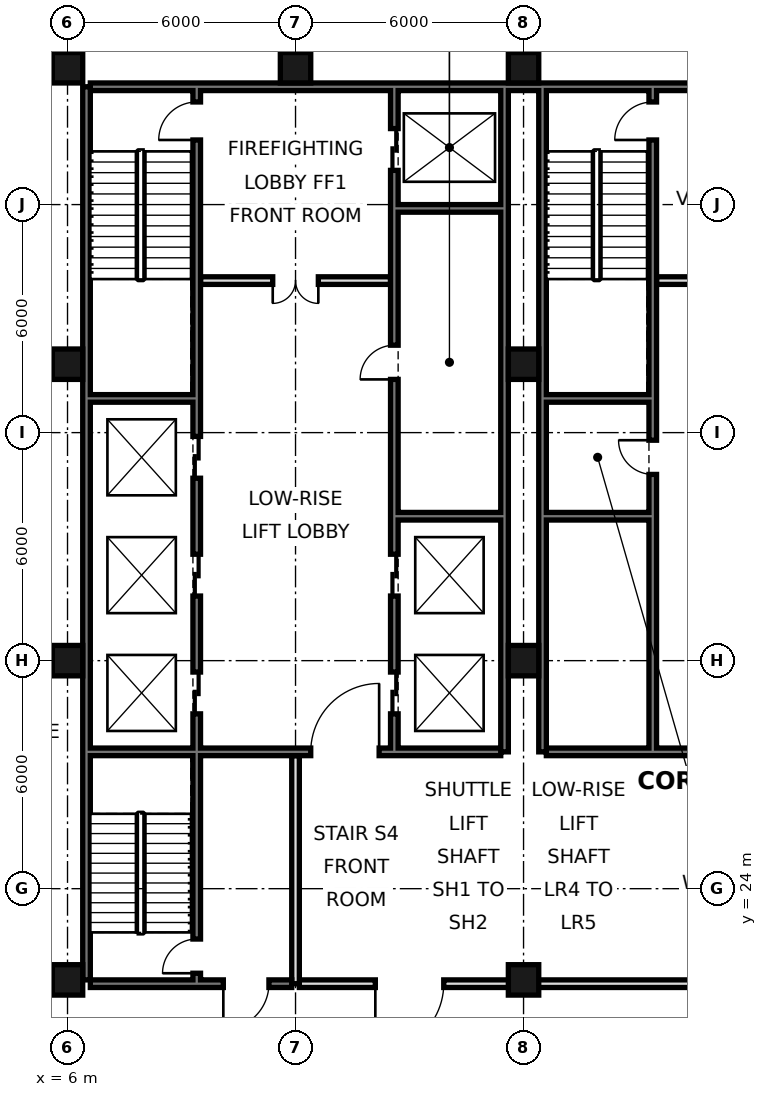
"""IFC4 building model, lengths in metres.
Left out: names, types, materials, properties, quantities, classifications, styles, units other than length and angle.
Written with IfcOpenShell. Run it as: python <this file> out.ifc"""

import sys

from ifc_helpers import new_model, si_unit, direction, frame, frame_2d, origin, origin_2d, place, context, subcontext, project, spatial, rectangle, hollow_rectangle, extrude, element, fill, save


model = new_model("IFC4")
c1 = context("Model", 3, precision=1e-05, world=origin(), true_north=direction((0.0, 1.0)))
c2 = subcontext(c1, "Body", "Model", "MODEL_VIEW")
j1 = project(units=[si_unit("LENGTHUNIT", "METRE"), si_unit("PLANEANGLEUNIT", "RADIAN")], contexts=[c1])
p1 = place(None, origin())
s1 = spatial("IfcSite", under=j1, at=p1, CompositionType="ELEMENT")
p2 = place(p1, origin())
s2 = spatial("IfcBuilding", under=s1, at=p2, CompositionType="ELEMENT")
p3 = place(p2, frame((0.0, 0.0, -4.5)))
s3 = spatial("IfcBuildingStorey", under=s2, at=p3, CompositionType="ELEMENT", Elevation=-4.5)
for number, where, z_axis, x_axis in (
    (1, (6.0, 21.6, 0.0), (0.0, 0.0, 1.0), (1.0, 0.0, 0.0)),
    (2, (6.0, 30.0, 0.0), (0.0, 0.0, 1.0), (1.0, 0.0, 0.0)),
    (3, (6.0, 37.8, 0.0), (0.0, 0.0, 1.0), (1.0, 0.0, 0.0)),
    (4, (6.0, 45.6, 0.0), (0.0, 0.0, 1.0), (1.0, 0.0, 0.0)),
    (5, (12.0, 45.6, 0.0), (0.0, 0.0, 1.0), (1.0, 0.0, 0.0)),
    (6, (18.0, 21.6, 0.0), (0.0, 0.0, 1.0), (1.0, 0.0, 0.0)),
    (7, (18.0, 30.0, 0.0), (0.0, 0.0, 1.0), (1.0, 0.0, 0.0)),
    (8, (18.0, 37.8, 0.0), (0.0, 0.0, 1.0), (1.0, 0.0, 0.0)),
    (9, (18.0, 45.6, 0.0), (0.0, 0.0, 1.0), (1.0, 0.0, 0.0)),
):
    element("IfcColumn", number, at=place(p3, frame(where, z_axis=z_axis, x_axis=x_axis)), inside=s3, PredefinedType="COLUMN", context=c2, shape_type="SweptSolid", body=[
        extrude(hollow_rectangle(XDim=0.8, YDim=0.8, WallThickness=0.07, at=origin_2d()), origin(), (0.0, 0.0, 1.0), 4.5),
    ])
p4 = place(p3, frame((6.5, 21.6, 0.0), z_axis=(0.0, 0.0, 1.0), x_axis=(0.0, 1.0, 0.0)))
e10 = element("IfcWall", 10, at=p4, inside=s3, PredefinedType="SOLIDWALL", context=c2, shape_type="SweptSolid", body=[
    extrude(rectangle(XDim=23.5, YDim=0.2, at=frame_2d((11.75, 0.0))), origin(), (0.0, 0.0, 1.0), 4.14),
])
p5 = place(p3, frame((6.6, 45.1, 0.0), z_axis=(0.0, 0.0, 1.0), x_axis=(1.0, 0.0, 0.0)))
e11 = element("IfcWall", 11, at=p5, inside=s3, PredefinedType="SOLIDWALL", context=c2, shape_type="SweptSolid", body=[
    extrude(rectangle(XDim=34.8, YDim=0.2, at=frame_2d((17.4, 0.0))), origin(), (0.0, 0.0, 1.0), 4.14),
])
for number, where, z_axis, x_axis in (
    (12, (17.5, 27.6, 0.0), (0.0, 0.0, 1.0), (0.0, 1.0, 0.0)),
    (13, (18.5, 27.6, 0.0), (0.0, 0.0, 1.0), (0.0, 1.0, 0.0)),
):
    element("IfcWall", number, at=place(p3, frame(where, z_axis=z_axis, x_axis=x_axis)), inside=s3, PredefinedType="SOLIDWALL", context=c2, shape_type="SweptSolid", body=[
        extrude(rectangle(XDim=17.5, YDim=0.2, at=frame_2d((8.75, 0.0))), origin(), (0.0, 0.0, 1.0), 4.14),
    ])
p6 = place(p3, frame((12.1, 21.5, 0.0), z_axis=(0.0, 0.0, 1.0), x_axis=(1.0, 0.0, 0.0)))
e14 = element("IfcWall", 14, at=p6, inside=s3, PredefinedType="SOLIDWALL", context=c2, shape_type="SweptSolid", body=[
    extrude(rectangle(XDim=23.8, YDim=0.2, at=frame_2d((11.9, 0.0))), origin(), (0.0, 0.0, 1.0), 3.04),
])
p7 = place(p6, frame((2.0, 0.0, 0.0)))
e15 = element("IfcOpeningElement", 15, at=p7, cuts=e14, PredefinedType="OPENING", context=c2, shape_type="SweptSolid", body=[
    extrude(rectangle(XDim=1.8, YDim=2.1, at=frame_2d((0.9, 1.05))), frame((0.0, 0.11, 0.0), z_axis=(0.0, -1.0, 0.0), x_axis=(1.0, 0.0, 0.0)), (0.0, 0.0, 1.0), 0.22),
])
p8 = place(p6, frame((11.0, 0.0, 0.0)))
e16 = element("IfcOpeningElement", 16, at=p8, cuts=e14, PredefinedType="OPENING", context=c2, shape_type="SweptSolid", body=[
    extrude(rectangle(XDim=1.8, YDim=2.1, at=frame_2d((0.9, 1.05))), frame((0.0, 0.11, 0.0), z_axis=(0.0, -1.0, 0.0), x_axis=(1.0, 0.0, 0.0)), (0.0, 0.0, 1.0), 0.22),
])
p9 = place(p6, frame((20.0, 0.0, 0.0)))
e17 = element("IfcOpeningElement", 17, at=p9, cuts=e14, PredefinedType="OPENING", context=c2, shape_type="SweptSolid", body=[
    extrude(rectangle(XDim=1.8, YDim=2.1, at=frame_2d((0.9, 1.05))), frame((0.0, 0.11, 0.0), z_axis=(0.0, -1.0, 0.0), x_axis=(1.0, 0.0, 0.0)), (0.0, 0.0, 1.0), 0.22),
])
p10 = place(p3, frame((12.0, 21.5, 0.0), z_axis=(0.0, 0.0, 1.0), x_axis=(0.0, 1.0, 0.0)))
e18 = element("IfcWall", 18, at=p10, inside=s3, PredefinedType="PARTITIONING", context=c2, shape_type="SweptSolid", body=[
    extrude(rectangle(XDim=6.0, YDim=0.2, at=frame_2d((3.0, 0.0))), origin(), (0.0, 0.0, 1.0), 3.04),
])
p11 = place(p3, frame((14.6, 27.7, 0.0), z_axis=(0.0, 0.0, 1.0), x_axis=(0.0, 1.0, 0.0)))
e19 = element("IfcWall", 19, at=p11, inside=s3, PredefinedType="SOLIDWALL", context=c2, shape_type="SweptSolid", body=[
    extrude(rectangle(XDim=17.3, YDim=0.2, at=frame_2d((8.65, 0.0))), origin(), (0.0, 0.0, 1.0), 4.14),
])
p12 = place(p11, frame((0.9, 0.0, 0.0)))
e20 = element("IfcOpeningElement", 20, at=p12, cuts=e19, PredefinedType="OPENING", context=c2, shape_type="SweptSolid", body=[
    extrude(rectangle(XDim=1.1, YDim=2.1, at=frame_2d((0.55, 1.05))), frame((0.0, 0.11, 0.0), z_axis=(0.0, -1.0, 0.0), x_axis=(1.0, 0.0, 0.0)), (0.0, 0.0, 1.0), 0.22),
])
p13 = place(p11, frame((4.0, 0.0, 0.0)))
e21 = element("IfcOpeningElement", 21, at=p13, cuts=e19, PredefinedType="OPENING", context=c2, shape_type="SweptSolid", body=[
    extrude(rectangle(XDim=1.1, YDim=2.1, at=frame_2d((0.55, 1.05))), frame((0.0, 0.11, 0.0), z_axis=(0.0, -1.0, 0.0), x_axis=(1.0, 0.0, 0.0)), (0.0, 0.0, 1.0), 0.22),
])
p14 = place(p11, frame((15.2, 0.0, 0.0)))
e22 = element("IfcOpeningElement", 22, at=p14, cuts=e19, PredefinedType="OPENING", context=c2, shape_type="SweptSolid", body=[
    extrude(rectangle(XDim=1.1, YDim=2.1, at=frame_2d((0.55, 1.05))), frame((0.0, 0.11, 0.0), z_axis=(0.0, -1.0, 0.0), x_axis=(1.0, 0.0, 0.0)), (0.0, 0.0, 1.0), 0.22),
])
p15 = place(p11, frame((9.7, 0.0, 0.0)))
e23 = element("IfcOpeningElement", 23, at=p15, cuts=e19, PredefinedType="OPENING", context=c2, shape_type="SweptSolid", body=[
    extrude(rectangle(XDim=0.9, YDim=2.1, at=frame_2d((0.45, 1.05))), frame((0.0, 0.11, 0.0), z_axis=(0.0, -1.0, 0.0), x_axis=(1.0, 0.0, 0.0)), (0.0, 0.0, 1.0), 0.22),
])
p16 = place(p3, frame((21.4, 27.7, 0.0), z_axis=(0.0, 0.0, 1.0), x_axis=(0.0, 1.0, 0.0)))
e24 = element("IfcWall", 24, at=p16, inside=s3, PredefinedType="SOLIDWALL", context=c2, shape_type="SweptSolid", body=[
    extrude(rectangle(XDim=17.3, YDim=0.2, at=frame_2d((8.65, 0.0))), origin(), (0.0, 0.0, 1.0), 4.14),
])
p17 = place(p16, frame((16.0, 0.0, 0.0)))
e25 = element("IfcOpeningElement", 25, at=p17, cuts=e24, PredefinedType="OPENING", context=c2, shape_type="SweptSolid", body=[
    extrude(rectangle(XDim=1.0, YDim=2.1, at=frame_2d((0.5, 1.05))), frame((0.0, 0.11, 0.0), z_axis=(0.0, -1.0, 0.0), x_axis=(1.0, 0.0, 0.0)), (0.0, 0.0, 1.0), 0.22),
])
p18 = place(p16, frame((7.2, 0.0, 0.0)))
e26 = element("IfcOpeningElement", 26, at=p18, cuts=e24, PredefinedType="OPENING", context=c2, shape_type="SweptSolid", body=[
    extrude(rectangle(XDim=0.9, YDim=2.1, at=frame_2d((0.45, 1.05))), frame((0.0, 0.11, 0.0), z_axis=(0.0, -1.0, 0.0), x_axis=(1.0, 0.0, 0.0)), (0.0, 0.0, 1.0), 0.22),
])
p19 = place(p3, frame((9.4, 21.5, 0.0), z_axis=(0.0, 0.0, 1.0), x_axis=(0.0, 1.0, 0.0)))
e27 = element("IfcWall", 27, at=p19, inside=s3, PredefinedType="SOLIDWALL", context=c2, shape_type="SweptSolid", body=[
    extrude(rectangle(XDim=23.5, YDim=0.2, at=frame_2d((11.75, 0.0))), origin(), (0.0, 0.0, 1.0), 3.04),
])
p20 = place(p19, frame((7.1, 0.0, 0.0)))
e28 = element("IfcOpeningElement", 28, at=p20, cuts=e27, PredefinedType="OPENING", context=c2, shape_type="SweptSolid", body=[
    extrude(rectangle(XDim=1.1, YDim=2.1, at=frame_2d((0.55, 1.05))), frame((0.0, 0.11, 0.0), z_axis=(0.0, -1.0, 0.0), x_axis=(1.0, 0.0, 0.0)), (0.0, 0.0, 1.0), 0.22),
])
p21 = place(p19, frame((10.2, 0.0, 0.0)))
e29 = element("IfcOpeningElement", 29, at=p21, cuts=e27, PredefinedType="OPENING", context=c2, shape_type="SweptSolid", body=[
    extrude(rectangle(XDim=1.1, YDim=2.1, at=frame_2d((0.55, 1.05))), frame((0.0, 0.11, 0.0), z_axis=(0.0, -1.0, 0.0), x_axis=(1.0, 0.0, 0.0)), (0.0, 0.0, 1.0), 0.22),
])
p22 = place(p19, frame((13.3, 0.0, 0.0)))
e30 = element("IfcOpeningElement", 30, at=p22, cuts=e27, PredefinedType="OPENING", context=c2, shape_type="SweptSolid", body=[
    extrude(rectangle(XDim=1.1, YDim=2.1, at=frame_2d((0.55, 1.05))), frame((0.0, 0.11, 0.0), z_axis=(0.0, -1.0, 0.0), x_axis=(1.0, 0.0, 0.0)), (0.0, 0.0, 1.0), 0.22),
])
p23 = place(p19, frame((22.2, 0.0, 0.0)))
e31 = element("IfcOpeningElement", 31, at=p23, cuts=e27, PredefinedType="OPENING", context=c2, shape_type="SweptSolid", body=[
    extrude(rectangle(XDim=1.0, YDim=2.1, at=frame_2d((0.5, 1.05))), frame((0.0, 0.11, 0.0), z_axis=(0.0, -1.0, 0.0), x_axis=(1.0, 0.0, 0.0)), (0.0, 0.0, 1.0), 0.22),
])
p24 = place(p19, frame((0.275, 0.0, 0.0)))
e32 = element("IfcOpeningElement", 32, at=p24, cuts=e27, PredefinedType="OPENING", context=c2, shape_type="SweptSolid", body=[
    extrude(rectangle(XDim=0.9, YDim=2.1, at=frame_2d((0.45, 1.05))), frame((0.0, 0.11, 0.0), z_axis=(0.0, -1.0, 0.0), x_axis=(1.0, 0.0, 0.0)), (0.0, 0.0, 1.0), 0.22),
])
p25 = place(p3, frame((6.6, 21.5, 0.0), z_axis=(0.0, 0.0, 1.0), x_axis=(1.0, 0.0, 0.0)))
e33 = element("IfcWall", 33, at=p25, inside=s3, PredefinedType="SOLIDWALL", context=c2, shape_type="SweptSolid", body=[
    extrude(rectangle(XDim=5.3, YDim=0.2, at=frame_2d((2.65, 0.0))), origin(), (0.0, 0.0, 1.0), 3.04),
])
p26 = place(p25, frame((3.5, 0.0, 0.0)))
e34 = element("IfcOpeningElement", 34, at=p26, cuts=e33, PredefinedType="OPENING", context=c2, shape_type="SweptSolid", body=[
    extrude(rectangle(XDim=1.2, YDim=2.1, at=frame_2d((0.6, 1.05))), frame((0.0, 0.11, 0.0), z_axis=(0.0, -1.0, 0.0), x_axis=(1.0, 0.0, 0.0)), (0.0, 0.0, 1.0), 0.22),
])
p27 = place(p3, frame((18.6, 27.6, 0.0), z_axis=(0.0, 0.0, 1.0), x_axis=(1.0, 0.0, 0.0)))
e35 = element("IfcWall", 35, at=p27, inside=s3, PredefinedType="SOLIDWALL", context=c2, shape_type="SweptSolid", body=[
    extrude(rectangle(XDim=10.8, YDim=0.2, at=frame_2d((5.4, 0.0))), origin(), (0.0, 0.0, 1.0), 4.14),
])
p28 = place(p27, frame((4.5, 0.0, 0.0)))
e36 = element("IfcOpeningElement", 36, at=p28, cuts=e35, PredefinedType="OPENING", context=c2, shape_type="SweptSolid", body=[
    extrude(rectangle(XDim=1.8, YDim=2.1, at=frame_2d((0.9, 1.05))), frame((0.0, 0.11, 0.0), z_axis=(0.0, -1.0, 0.0), x_axis=(1.0, 0.0, 0.0)), (0.0, 0.0, 1.0), 0.22),
])
p29 = place(p3, frame((6.6, 27.6, 0.0), z_axis=(0.0, 0.0, 1.0), x_axis=(1.0, 0.0, 0.0)))
e37 = element("IfcWall", 37, at=p29, inside=s3, PredefinedType="SOLIDWALL", context=c2, shape_type="SweptSolid", body=[
    extrude(rectangle(XDim=10.8, YDim=0.2, at=frame_2d((5.4, 0.0))), origin(), (0.0, 0.0, 1.0), 4.14),
])
p30 = place(p29, frame((5.8, 0.0, 0.0)))
e38 = element("IfcOpeningElement", 38, at=p30, cuts=e37, PredefinedType="OPENING", context=c2, shape_type="SweptSolid", body=[
    extrude(rectangle(XDim=1.8, YDim=2.1, at=frame_2d((0.9, 1.05))), frame((0.0, 0.11, 0.0), z_axis=(0.0, -1.0, 0.0), x_axis=(1.0, 0.0, 0.0)), (0.0, 0.0, 1.0), 0.22),
])
for number, where, z_axis, x_axis in (
    (39, (14.7, 33.8, 0.0), (0.0, 0.0, 1.0), (1.0, 0.0, 0.0)),
    (40, (18.6, 33.8, 0.0), (0.0, 0.0, 1.0), (1.0, 0.0, 0.0)),
    (41, (18.6, 36.9, 0.0), (0.0, 0.0, 1.0), (1.0, 0.0, 0.0)),
    (42, (6.6, 36.9, 0.0), (0.0, 0.0, 1.0), (1.0, 0.0, 0.0)),
):
    element("IfcWall", number, at=place(p3, frame(where, z_axis=z_axis, x_axis=x_axis)), inside=s3, PredefinedType="SOLIDWALL", context=c2, shape_type="SweptSolid", body=[
        extrude(rectangle(XDim=2.7, YDim=0.2, at=frame_2d((1.35, 0.0))), origin(), (0.0, 0.0, 1.0), 4.14),
    ])
p31 = place(p3, frame((21.5, 40.0, 0.0), z_axis=(0.0, 0.0, 1.0), x_axis=(1.0, 0.0, 0.0)))
e43 = element("IfcWall", 43, at=p31, inside=s3, PredefinedType="PARTITIONING", context=c2, shape_type="SweptSolid", body=[
    extrude(rectangle(XDim=7.9, YDim=0.2, at=frame_2d((3.95, 0.0))), origin(), (0.0, 0.0, 1.0), 4.14),
])
p32 = place(p31, frame((1.9, 0.0, 0.0)))
e44 = element("IfcOpeningElement", 44, at=p32, cuts=e43, PredefinedType="OPENING", context=c2, shape_type="SweptSolid", body=[
    extrude(rectangle(XDim=1.2, YDim=2.1, at=frame_2d((0.6, 1.05))), frame((0.0, 0.11, 0.0), z_axis=(0.0, -1.0, 0.0), x_axis=(1.0, 0.0, 0.0)), (0.0, 0.0, 1.0), 0.22),
])
p33 = place(p3, frame((9.5, 40.0, 0.0), z_axis=(0.0, 0.0, 1.0), x_axis=(1.0, 0.0, 0.0)))
e45 = element("IfcWall", 45, at=p33, inside=s3, PredefinedType="PARTITIONING", context=c2, shape_type="SweptSolid", body=[
    extrude(rectangle(XDim=5.0, YDim=0.2, at=frame_2d((2.5, 0.0))), origin(), (0.0, 0.0, 1.0), 4.14),
])
p34 = place(p33, frame((1.9, 0.0, 0.0)))
e46 = element("IfcOpeningElement", 46, at=p34, cuts=e45, PredefinedType="OPENING", context=c2, shape_type="SweptSolid", body=[
    extrude(rectangle(XDim=1.2, YDim=2.1, at=frame_2d((0.6, 1.05))), frame((0.0, 0.11, 0.0), z_axis=(0.0, -1.0, 0.0), x_axis=(1.0, 0.0, 0.0)), (0.0, 0.0, 1.0), 0.22),
])
p35 = place(p3, frame((14.7, 41.9, 0.0), z_axis=(0.0, 0.0, 1.0), x_axis=(1.0, 0.0, 0.0)))
e47 = element("IfcWall", 47, at=p35, inside=s3, PredefinedType="SOLIDWALL", context=c2, shape_type="SweptSolid", body=[
    extrude(rectangle(XDim=2.7, YDim=0.2, at=frame_2d((1.35, 0.0))), origin(), (0.0, 0.0, 1.0), 4.14),
])
p36 = place(p7, frame((1.8, 0.0, 0.0), z_axis=(0.0, 0.0, 1.0), x_axis=(-1.0, 0.0, 0.0)))
e48 = element("IfcDoor", 48, at=p36, inside=s3, OperationType="SINGLE_SWING_RIGHT", PredefinedType="DOOR", context=c2, shape_type="SweptSolid", body=[
    extrude(rectangle(XDim=1.8, YDim=2.1, at=frame_2d((0.9, 1.05))), frame((0.0, 0.025, 0.0), z_axis=(0.0, -1.0, 0.0), x_axis=(1.0, 0.0, 0.0)), (0.0, 0.0, 1.0), 0.05),
])
fill(e15, e48)
p37 = place(p26, frame((1.2, 0.0, 0.0), z_axis=(0.0, 0.0, 1.0), x_axis=(-1.0, 0.0, 0.0)))
e49 = element("IfcDoor", 49, at=p37, inside=s3, OperationType="SINGLE_SWING_RIGHT", PredefinedType="DOOR", context=c2, shape_type="SweptSolid", body=[
    extrude(rectangle(XDim=1.2, YDim=2.1, at=frame_2d((0.6, 1.05))), frame((0.0, 0.025, 0.0), z_axis=(0.0, -1.0, 0.0), x_axis=(1.0, 0.0, 0.0)), (0.0, 0.0, 1.0), 0.05),
])
fill(e34, e49)
p38 = place(p30, frame((1.8, 0.0, 0.0), z_axis=(0.0, 0.0, 1.0), x_axis=(-1.0, 0.0, 0.0)))
e50 = element("IfcDoor", 50, at=p38, inside=s3, OperationType="SINGLE_SWING_LEFT", PredefinedType="DOOR", context=c2, shape_type="SweptSolid", body=[
    extrude(rectangle(XDim=1.8, YDim=2.1, at=frame_2d((0.9, 1.05))), frame((0.0, 0.025, 0.0), z_axis=(0.0, -1.0, 0.0), x_axis=(1.0, 0.0, 0.0)), (0.0, 0.0, 1.0), 0.05),
])
fill(e38, e50)
p39 = place(p34, frame((1.2, 0.0, 0.0), z_axis=(0.0, 0.0, 1.0), x_axis=(-1.0, 0.0, 0.0)))
e51 = element("IfcDoor", 51, at=p39, inside=s3, OperationType="DOUBLE_DOOR_SINGLE_SWING", PredefinedType="DOOR", context=c2, shape_type="SweptSolid", body=[
    extrude(rectangle(XDim=1.2, YDim=2.1, at=frame_2d((0.6, 1.05))), frame((0.0, 0.025, 0.0), z_axis=(0.0, -1.0, 0.0), x_axis=(1.0, 0.0, 0.0)), (0.0, 0.0, 1.0), 0.05),
])
fill(e46, e51)
p40 = place(p12, origin())
e52 = element("IfcDoor", 52, at=p40, inside=s3, OperationType="DOUBLE_DOOR_SLIDING", PredefinedType="DOOR", context=c2, shape_type="SweptSolid", body=[
    extrude(rectangle(XDim=1.1, YDim=2.1, at=frame_2d((0.55, 1.05))), frame((0.0, 0.025, 0.0), z_axis=(0.0, -1.0, 0.0), x_axis=(1.0, 0.0, 0.0)), (0.0, 0.0, 1.0), 0.05),
])
fill(e20, e52)
p41 = place(p13, origin())
e53 = element("IfcDoor", 53, at=p41, inside=s3, OperationType="DOUBLE_DOOR_SLIDING", PredefinedType="DOOR", context=c2, shape_type="SweptSolid", body=[
    extrude(rectangle(XDim=1.1, YDim=2.1, at=frame_2d((0.55, 1.05))), frame((0.0, 0.025, 0.0), z_axis=(0.0, -1.0, 0.0), x_axis=(1.0, 0.0, 0.0)), (0.0, 0.0, 1.0), 0.05),
])
fill(e21, e53)
p42 = place(p14, origin())
e54 = element("IfcDoor", 54, at=p42, inside=s3, OperationType="DOUBLE_DOOR_SLIDING", PredefinedType="DOOR", context=c2, shape_type="SweptSolid", body=[
    extrude(rectangle(XDim=1.1, YDim=2.1, at=frame_2d((0.55, 1.05))), frame((0.0, 0.025, 0.0), z_axis=(0.0, -1.0, 0.0), x_axis=(1.0, 0.0, 0.0)), (0.0, 0.0, 1.0), 0.05),
])
fill(e22, e54)
p43 = place(p20, origin())
e55 = element("IfcDoor", 55, at=p43, inside=s3, OperationType="DOUBLE_DOOR_SLIDING", PredefinedType="DOOR", context=c2, shape_type="SweptSolid", body=[
    extrude(rectangle(XDim=1.1, YDim=2.1, at=frame_2d((0.55, 1.05))), frame((0.0, 0.025, 0.0), z_axis=(0.0, -1.0, 0.0), x_axis=(1.0, 0.0, 0.0)), (0.0, 0.0, 1.0), 0.05),
])
fill(e28, e55)
p44 = place(p21, origin())
e56 = element("IfcDoor", 56, at=p44, inside=s3, OperationType="DOUBLE_DOOR_SLIDING", PredefinedType="DOOR", context=c2, shape_type="SweptSolid", body=[
    extrude(rectangle(XDim=1.1, YDim=2.1, at=frame_2d((0.55, 1.05))), frame((0.0, 0.025, 0.0), z_axis=(0.0, -1.0, 0.0), x_axis=(1.0, 0.0, 0.0)), (0.0, 0.0, 1.0), 0.05),
])
fill(e29, e56)
p45 = place(p22, origin())
e57 = element("IfcDoor", 57, at=p45, inside=s3, OperationType="DOUBLE_DOOR_SLIDING", PredefinedType="DOOR", context=c2, shape_type="SweptSolid", body=[
    extrude(rectangle(XDim=1.1, YDim=2.1, at=frame_2d((0.55, 1.05))), frame((0.0, 0.025, 0.0), z_axis=(0.0, -1.0, 0.0), x_axis=(1.0, 0.0, 0.0)), (0.0, 0.0, 1.0), 0.05),
])
fill(e30, e57)
p46 = place(p23, origin())
e58 = element("IfcDoor", 58, at=p46, inside=s3, OperationType="SINGLE_SWING_LEFT", PredefinedType="DOOR", context=c2, shape_type="SweptSolid", body=[
    extrude(rectangle(XDim=1.0, YDim=2.1, at=frame_2d((0.5, 1.05))), frame((0.0, 0.025, 0.0), z_axis=(0.0, -1.0, 0.0), x_axis=(1.0, 0.0, 0.0)), (0.0, 0.0, 1.0), 0.05),
])
fill(e31, e58)
p47 = place(p17, origin())
e59 = element("IfcDoor", 59, at=p47, inside=s3, OperationType="SINGLE_SWING_LEFT", PredefinedType="DOOR", context=c2, shape_type="SweptSolid", body=[
    extrude(rectangle(XDim=1.0, YDim=2.1, at=frame_2d((0.5, 1.05))), frame((0.0, 0.025, 0.0), z_axis=(0.0, -1.0, 0.0), x_axis=(1.0, 0.0, 0.0)), (0.0, 0.0, 1.0), 0.05),
])
fill(e25, e59)
p48 = place(p24, origin())
e60 = element("IfcDoor", 60, at=p48, inside=s3, OperationType="SINGLE_SWING_LEFT", PredefinedType="DOOR", context=c2, shape_type="SweptSolid", body=[
    extrude(rectangle(XDim=0.9, YDim=2.1, at=frame_2d((0.45, 1.05))), frame((0.0, 0.025, 0.0), z_axis=(0.0, -1.0, 0.0), x_axis=(1.0, 0.0, 0.0)), (0.0, 0.0, 1.0), 0.05),
])
fill(e32, e60)
p49 = place(p15, origin())
e61 = element("IfcDoor", 61, at=p49, inside=s3, OperationType="SINGLE_SWING_LEFT", PredefinedType="DOOR", context=c2, shape_type="SweptSolid", body=[
    extrude(rectangle(XDim=0.9, YDim=2.1, at=frame_2d((0.45, 1.05))), frame((0.0, 0.025, 0.0), z_axis=(0.0, -1.0, 0.0), x_axis=(1.0, 0.0, 0.0)), (0.0, 0.0, 1.0), 0.05),
])
fill(e23, e61)
p50 = place(p18, frame((0.9, 0.0, 0.0), z_axis=(0.0, 0.0, 1.0), x_axis=(-1.0, 0.0, 0.0)))
e62 = element("IfcDoor", 62, at=p50, inside=s3, OperationType="SINGLE_SWING_LEFT", PredefinedType="DOOR", context=c2, shape_type="SweptSolid", body=[
    extrude(rectangle(XDim=0.9, YDim=2.1, at=frame_2d((0.45, 1.05))), frame((0.0, 0.025, 0.0), z_axis=(0.0, -1.0, 0.0), x_axis=(1.0, 0.0, 0.0)), (0.0, 0.0, 1.0), 0.05),
])
fill(e26, e62)
save(model, sys.argv[1])
